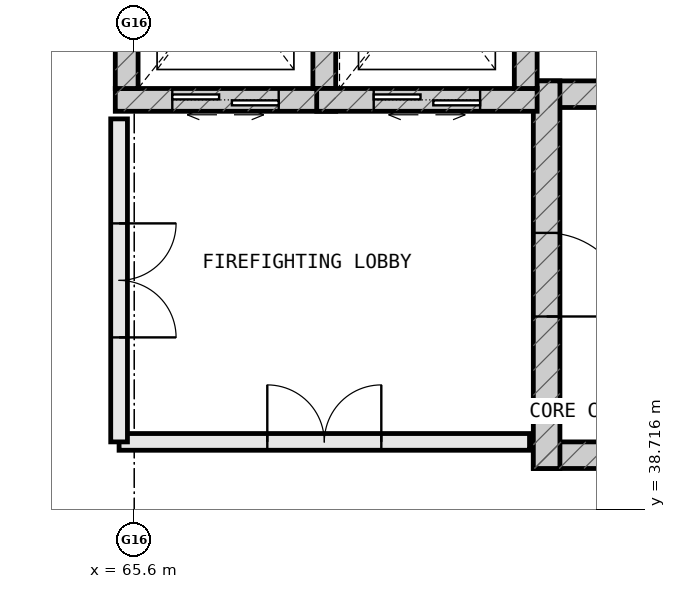
"""IFC4 building model, lengths in metres.
Left out: names, types, materials, properties, quantities, classifications, styles, units other than length and angle.
Written with IfcOpenShell. Run it as: python <this file> out.ifc"""

import sys

from ifc_helpers import new_model, si_unit, direction, frame, frame_2d, origin, place, context, subcontext, project, spatial, rectangle, extrude, element, fill, save


model = new_model("IFC4")
c1 = context("Model", 3, precision=1e-05, world=origin(), true_north=direction((0.0, 1.0)))
c2 = subcontext(c1, "Body", "Model", "MODEL_VIEW")
j1 = project(units=[si_unit("LENGTHUNIT", "METRE"), si_unit("PLANEANGLEUNIT", "RADIAN")], contexts=[c1])
p1 = place(None, origin())
s1 = spatial("IfcSite", under=j1, at=p1, CompositionType="ELEMENT")
p2 = place(p1, origin())
s2 = spatial("IfcBuilding", under=s1, at=p2, CompositionType="ELEMENT")
p3 = place(p2, origin())
s3 = spatial("IfcBuildingStorey", under=s2, at=p3, CompositionType="ELEMENT", Elevation=0.0)
for number, where, z_axis, x_axis in (
    (1, (70.85, 39.425, 0.0), (0.0, 0.0, 1.0), (1.0, 0.0, 0.0)),
    (2, (82.95, 44.175, 0.0), (0.0, 0.0, 1.0), (-1.0, 0.0, 0.0)),
):
    element("IfcWall", number, at=place(p3, frame(where, z_axis=z_axis, x_axis=x_axis)), inside=s3, PredefinedType="SHEAR", context=c2, shape_type="SweptSolid", body=[
        extrude(rectangle(XDim=12.1, YDim=0.35, at=frame_2d((6.05, 0.0))), origin(), (0.0, 0.0, 1.0), 5.4),
    ])
p4 = place(p3, frame((71.025, 44.35, 0.0), z_axis=(0.0, 0.0, 1.0), x_axis=(0.0, -1.0, 0.0)))
e3 = element("IfcWall", 3, at=p4, inside=s3, PredefinedType="SHEAR", context=c2, shape_type="SweptSolid", body=[
    extrude(rectangle(XDim=5.1, YDim=0.35, at=frame_2d((2.55, 0.0))), origin(), (0.0, 0.0, 1.0), 5.4),
])
p5 = place(p4, frame((2.0, 0.0, 0.0)))
e4 = element("IfcOpeningElement", 4, at=p5, cuts=e3, PredefinedType="OPENING", context=c2, shape_type="SweptSolid", body=[
    extrude(rectangle(XDim=1.1, YDim=2.2, at=frame_2d((0.55, 1.1))), frame((0.0, 0.187, 0.0), z_axis=(0.0, -1.0, 0.0), x_axis=(1.0, 0.0, 0.0)), (0.0, 0.0, 1.0), 0.374),
])
p6 = place(p3, frame((65.35, 44.1, 0.0), z_axis=(0.0, 0.0, 1.0), x_axis=(1.0, 0.0, 0.0)))
e5 = element("IfcWall", 5, at=p6, inside=s3, PredefinedType="SHEAR", context=c2, shape_type="SweptSolid", body=[
    extrude(rectangle(XDim=2.9, YDim=0.3, at=frame_2d((1.45, 0.0))), origin(), (0.0, 0.0, 1.0), 5.4),
])
p7 = place(p6, frame((0.75, 0.0, 0.0)))
e6 = element("IfcOpeningElement", 6, at=p7, cuts=e5, PredefinedType="OPENING", context=c2, shape_type="SweptSolid", body=[
    extrude(rectangle(XDim=1.4, YDim=2.2, at=frame_2d((0.7, 1.1))), frame((0.0, 0.162, 0.0), z_axis=(0.0, -1.0, 0.0), x_axis=(1.0, 0.0, 0.0)), (0.0, 0.0, 1.0), 0.324),
])
for number, where, z_axis, x_axis in (
    (7, (68.1, 44.25, 0.0), (0.0, 0.0, 1.0), (0.0, 1.0, 0.0)),
    (8, (65.5, 47.15, 0.0), (0.0, 0.0, 1.0), (0.0, -1.0, 0.0)),
):
    element("IfcWall", number, at=place(p3, frame(where, z_axis=z_axis, x_axis=x_axis)), inside=s3, PredefinedType="SHEAR", context=c2, shape_type="SweptSolid", body=[
        extrude(rectangle(XDim=2.9, YDim=0.3, at=frame_2d((1.45, 0.0))), origin(), (0.0, 0.0, 1.0), 5.4),
    ])
p8 = place(p3, frame((68.0, 44.1, 0.0), z_axis=(0.0, 0.0, 1.0), x_axis=(1.0, 0.0, 0.0)))
e9 = element("IfcWall", 9, at=p8, inside=s3, PredefinedType="SHEAR", context=c2, shape_type="SweptSolid", body=[
    extrude(rectangle(XDim=2.9, YDim=0.3, at=frame_2d((1.45, 0.0))), origin(), (0.0, 0.0, 1.0), 5.4),
])
p9 = place(p8, frame((0.75, 0.0, 0.0)))
e10 = element("IfcOpeningElement", 10, at=p9, cuts=e9, PredefinedType="OPENING", context=c2, shape_type="SweptSolid", body=[
    extrude(rectangle(XDim=1.4, YDim=2.2, at=frame_2d((0.7, 1.1))), frame((0.0, 0.162, 0.0), z_axis=(0.0, -1.0, 0.0), x_axis=(1.0, 0.0, 0.0)), (0.0, 0.0, 1.0), 0.324),
])
p10 = place(p3, frame((70.75, 44.25, 0.0), z_axis=(0.0, 0.0, 1.0), x_axis=(0.0, 1.0, 0.0)))
e11 = element("IfcWall", 11, at=p10, inside=s3, PredefinedType="SHEAR", context=c2, shape_type="SweptSolid", body=[
    extrude(rectangle(XDim=2.9, YDim=0.3, at=frame_2d((1.45, 0.0))), origin(), (0.0, 0.0, 1.0), 5.4),
])
p11 = place(p3, frame((65.4, 39.6, 0.0), z_axis=(0.0, 0.0, 1.0), x_axis=(1.0, 0.0, 0.0)))
e12 = element("IfcWall", 12, at=p11, inside=s3, PredefinedType="STANDARD", context=c2, shape_type="SweptSolid", body=[
    extrude(rectangle(XDim=5.4, YDim=0.22, at=frame_2d((2.7, 0.0))), origin(), (0.0, 0.0, 1.0), 5.12),
])
p12 = place(p11, frame((1.95, 0.0, 0.0)))
e13 = element("IfcOpeningElement", 13, at=p12, cuts=e12, PredefinedType="OPENING", context=c2, shape_type="SweptSolid", body=[
    extrude(rectangle(XDim=1.5, YDim=2.2, at=frame_2d((0.75, 1.1))), frame((0.0, 0.122, 0.0), z_axis=(0.0, -1.0, 0.0), x_axis=(1.0, 0.0, 0.0)), (0.0, 0.0, 1.0), 0.244),
])
p13 = place(p3, frame((65.4, 43.85, 0.0), z_axis=(0.0, 0.0, 1.0), x_axis=(0.0, -1.0, 0.0)))
e14 = element("IfcWall", 14, at=p13, inside=s3, PredefinedType="STANDARD", context=c2, shape_type="SweptSolid", body=[
    extrude(rectangle(XDim=4.25, YDim=0.22, at=frame_2d((2.125, 0.0))), origin(), (0.0, 0.0, 1.0), 5.12),
])
p14 = place(p13, frame((1.375, 0.0, 0.0)))
e15 = element("IfcOpeningElement", 15, at=p14, cuts=e14, PredefinedType="OPENING", context=c2, shape_type="SweptSolid", body=[
    extrude(rectangle(XDim=1.5, YDim=2.2, at=frame_2d((0.75, 1.1))), frame((0.0, 0.122, 0.0), z_axis=(0.0, -1.0, 0.0), x_axis=(1.0, 0.0, 0.0)), (0.0, 0.0, 1.0), 0.244),
])
p15 = place(p5, origin())
e16 = element("IfcDoor", 16, at=p15, inside=s3, OperationType="SINGLE_SWING_RIGHT", PredefinedType="DOOR", context=c2, shape_type="SweptSolid", body=[
    extrude(rectangle(XDim=1.1, YDim=2.2, at=frame_2d((0.55, 1.1))), frame((0.0, 0.025, 0.0), z_axis=(0.0, -1.0, 0.0), x_axis=(1.0, 0.0, 0.0)), (0.0, 0.0, 1.0), 0.05),
])
fill(e4, e16)
p16 = place(p7, origin())
e17 = element("IfcDoor", 17, at=p16, inside=s3, OperationType="DOUBLE_DOOR_SLIDING", PredefinedType="DOOR", context=c2, shape_type="SweptSolid", body=[
    extrude(rectangle(XDim=1.4, YDim=2.2, at=frame_2d((0.7, 1.1))), frame((0.0, 0.025, 0.0), z_axis=(0.0, -1.0, 0.0), x_axis=(1.0, 0.0, 0.0)), (0.0, 0.0, 1.0), 0.05),
])
fill(e6, e17)
p17 = place(p9, origin())
e18 = element("IfcDoor", 18, at=p17, inside=s3, OperationType="DOUBLE_DOOR_SLIDING", PredefinedType="DOOR", context=c2, shape_type="SweptSolid", body=[
    extrude(rectangle(XDim=1.4, YDim=2.2, at=frame_2d((0.7, 1.1))), frame((0.0, 0.025, 0.0), z_axis=(0.0, -1.0, 0.0), x_axis=(1.0, 0.0, 0.0)), (0.0, 0.0, 1.0), 0.05),
])
fill(e10, e18)
p18 = place(p12, origin())
e19 = element("IfcDoor", 19, at=p18, inside=s3, OperationType="DOUBLE_DOOR_SINGLE_SWING", PredefinedType="DOOR", context=c2, shape_type="SweptSolid", body=[
    extrude(rectangle(XDim=1.5, YDim=2.2, at=frame_2d((0.75, 1.1))), frame((0.0, 0.025, 0.0), z_axis=(0.0, -1.0, 0.0), x_axis=(1.0, 0.0, 0.0)), (0.0, 0.0, 1.0), 0.05),
])
fill(e13, e19)
p19 = place(p14, origin())
e20 = element("IfcDoor", 20, at=p19, inside=s3, OperationType="DOUBLE_DOOR_SINGLE_SWING", PredefinedType="DOOR", context=c2, shape_type="SweptSolid", body=[
    extrude(rectangle(XDim=1.5, YDim=2.2, at=frame_2d((0.75, 1.1))), frame((0.0, 0.025, 0.0), z_axis=(0.0, -1.0, 0.0), x_axis=(1.0, 0.0, 0.0)), (0.0, 0.0, 1.0), 0.05),
])
fill(e15, e20)
save(model, sys.argv[1])
